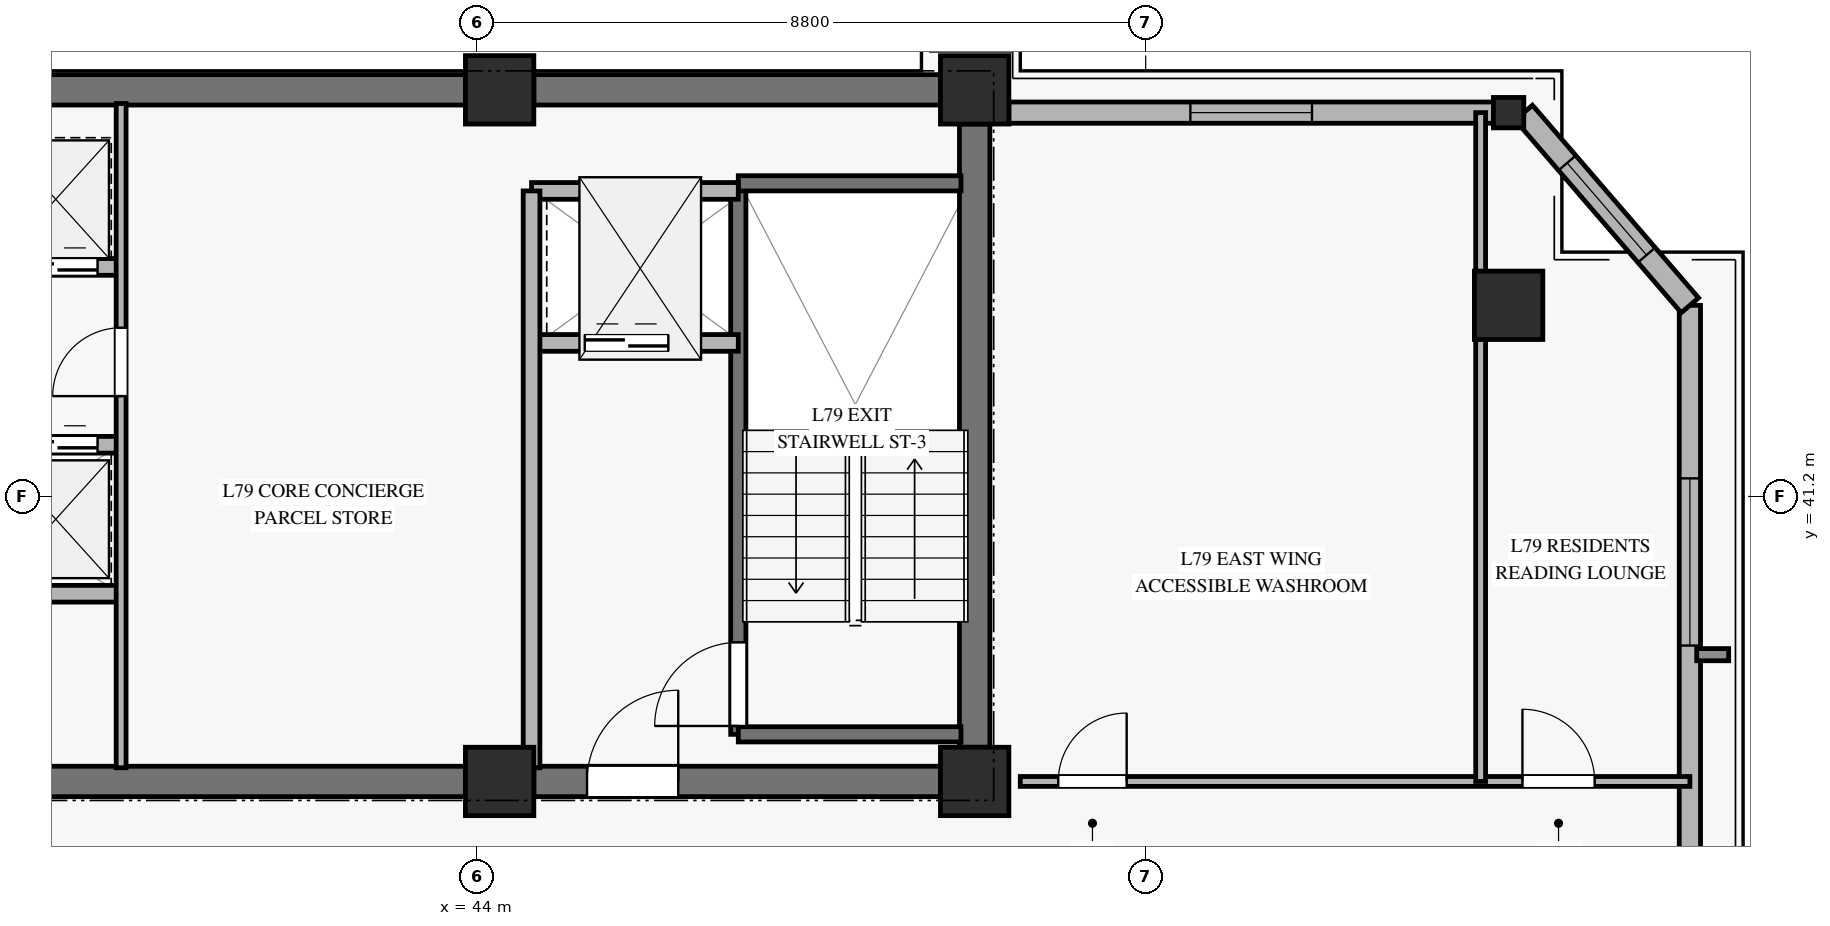
"""IFC4 building model, lengths in metres.
Left out: names, types, materials, properties, quantities, classifications, styles, units other than length and angle.
Written with IfcOpenShell. Run it as: python <this file> out.ifc"""

import sys

from ifc_helpers import new_model, si_unit, direction, frame, frame_2d, origin, origin_2d, place, context, subcontext, project, spatial, rectangle, hollow_rectangle, extrude, source, transform, mapped, element, fill, save


model = new_model("IFC4")
c1 = context("Model", 3, precision=1e-05, world=origin(), true_north=direction((0.0, 1.0)))
c2 = subcontext(c1, "Body", "Model", "MODEL_VIEW")
j1 = project(units=[si_unit("LENGTHUNIT", "METRE"), si_unit("PLANEANGLEUNIT", "RADIAN")], contexts=[c1])
p1 = place(None, origin())
s1 = spatial("IfcSite", under=j1, at=p1, CompositionType="ELEMENT")
p2 = place(p1, origin())
s2 = spatial("IfcBuilding", under=s1, at=p2, CompositionType="ELEMENT")
p3 = place(p2, frame((0.0, 0.0, 307.4)))
s3 = spatial("IfcBuildingStorey", under=s2, at=p3, CompositionType="ELEMENT", Elevation=307.4)
m1 = source(origin(), c2, "Body", "SweptSolid", [
    extrude(rectangle(XDim=0.9, YDim=0.9, at=origin_2d()), origin(), (0.0, 0.0, 1.0), 3.185),
])
for number, where, z_axis, x_axis in (
    (1, (44.3, 37.45, 0.0), (0.0, 0.0, 1.0), (1.0, 0.0, 0.0)),
    (2, (44.3, 46.55, 0.0), (0.0, 0.0, 1.0), (1.0, 0.0, 0.0)),
    (3, (50.55, 37.45, 0.0), (0.0, 0.0, 1.0), (1.0, 0.0, 0.0)),
    (4, (50.55, 46.55, 0.0), (0.0, 0.0, 1.0), (1.0, 0.0, 0.0)),
):
    element("IfcColumn", number, at=place(p3, frame(where, z_axis=z_axis, x_axis=x_axis)), inside=s3, PredefinedType="PILASTER", context=c2, shape_type="MappedRepresentation", body=[
        mapped(m1, transform((0.0, 0.0, 0.0), x_axis=(1.0, 0.0, 0.0), y_axis=(0.0, 1.0, 0.0), z_axis=(0.0, 0.0, 1.0), scale=1.0)),
    ])
p4 = place(p3, frame((36.05, 46.55, 0.0), z_axis=(0.0, 0.0, 1.0), x_axis=(1.0, 0.0, 0.0)))
e5 = element("IfcWall", 5, at=p4, inside=s3, PredefinedType="SHEAR", context=c2, shape_type="SweptSolid", body=[
    extrude(rectangle(XDim=7.8, YDim=0.4, at=frame_2d((3.9, 0.0))), origin(), (0.0, 0.0, 1.0), 3.185),
])
p5 = place(p3, frame((44.75, 46.55, 0.0), z_axis=(0.0, 0.0, 1.0), x_axis=(1.0, 0.0, 0.0)))
e6 = element("IfcWall", 6, at=p5, inside=s3, PredefinedType="SHEAR", context=c2, shape_type="SweptSolid", body=[
    extrude(rectangle(XDim=5.35, YDim=0.4, at=frame_2d((2.675, 0.0))), origin(), (0.0, 0.0, 1.0), 3.185),
])
p6 = place(p3, frame((36.05, 37.45, 0.0), z_axis=(0.0, 0.0, 1.0), x_axis=(1.0, 0.0, 0.0)))
e7 = element("IfcWall", 7, at=p6, inside=s3, PredefinedType="SHEAR", context=c2, shape_type="SweptSolid", body=[
    extrude(rectangle(XDim=7.8, YDim=0.4, at=frame_2d((3.9, 0.0))), origin(), (0.0, 0.0, 1.0), 3.185),
])
p7 = place(p3, frame((44.75, 37.45, 0.0), z_axis=(0.0, 0.0, 1.0), x_axis=(1.0, 0.0, 0.0)))
e8 = element("IfcWall", 8, at=p7, inside=s3, PredefinedType="SHEAR", context=c2, shape_type="SweptSolid", body=[
    extrude(rectangle(XDim=5.35, YDim=0.4, at=frame_2d((2.675, 0.0))), origin(), (0.0, 0.0, 1.0), 3.185),
])
p8 = place(p7, frame((0.7, 0.0, 0.0)))
e9 = element("IfcOpeningElement", 9, at=p8, cuts=e8, PredefinedType="OPENING", context=c2, shape_type="SweptSolid", body=[
    extrude(rectangle(XDim=1.2, YDim=2.15, at=frame_2d((0.6, 1.075))), frame((0.0, 0.21, 0.0), z_axis=(0.0, -1.0, 0.0), x_axis=(1.0, 0.0, 0.0)), (0.0, 0.0, 1.0), 0.42),
])
p9 = place(p3, frame((50.55, 37.9, 0.0), z_axis=(0.0, 0.0, 1.0), x_axis=(0.0, 1.0, 0.0)))
e10 = element("IfcWall", 10, at=p9, inside=s3, PredefinedType="SHEAR", context=c2, shape_type="SweptSolid", body=[
    extrude(rectangle(XDim=8.2, YDim=0.4, at=frame_2d((4.1, 0.0))), origin(), (0.0, 0.0, 1.0), 3.185),
])
m2 = source(origin(), c2, "Body", "SweptSolid", [
    extrude(hollow_rectangle(XDim=0.9, YDim=0.9, WallThickness=0.04, at=origin_2d()), origin(), (0.0, 0.0, 1.0), 3.185),
])
p10 = place(p3, frame((57.575, 43.715, 0.0), z_axis=(0.0, 0.0, 1.0), x_axis=(1.0, 0.0, 0.0)))
e11 = element("IfcColumn", 11, at=p10, inside=s3, PredefinedType="COLUMN", context=c2, shape_type="MappedRepresentation", body=[
    mapped(m2, transform((0.0, 0.0, 0.0), x_axis=(1.0, 0.0, 0.0), y_axis=(0.0, 1.0, 0.0), z_axis=(0.0, 0.0, 1.0), scale=1.0)),
])
m3 = source(origin(), c2, "Body", "SweptSolid", [
    extrude(hollow_rectangle(XDim=0.4, YDim=0.4, WallThickness=0.02, at=origin_2d()), origin(), (0.0, 0.0, 1.0), 3.185),
])
p11 = place(p3, frame((57.575, 46.25, 0.0), z_axis=(0.0, 0.0, 1.0), x_axis=(1.0, 0.0, 0.0)))
e12 = element("IfcColumn", 12, at=p11, inside=s3, PredefinedType="COLUMN", context=c2, shape_type="MappedRepresentation", body=[
    mapped(m3, transform((0.0, 0.0, 0.0), x_axis=(1.0, 0.0, 0.0), y_axis=(0.0, 1.0, 0.0), z_axis=(0.0, 0.0, 1.0), scale=1.0)),
])
p12 = place(p3, frame((59.96, 33.136, 0.0), z_axis=(0.0, 0.0, 1.0), x_axis=(0.0, 1.0, 0.0)))
e13 = element("IfcWall", 13, at=p12, inside=s3, PredefinedType="SOLIDWALL", context=c2, shape_type="SweptSolid", body=[
    extrude(rectangle(XDim=10.579, YDim=0.28, at=frame_2d((5.29, 0.0))), origin(), (0.0, 0.0, 1.0), 2.815),
])
p13 = place(p12, frame((6.102, 0.0, 0.45)))
e14 = element("IfcOpeningElement", 14, at=p13, cuts=e13, PredefinedType="OPENING", context=c2, shape_type="SweptSolid", body=[
    extrude(rectangle(XDim=2.2, YDim=2.1, at=frame_2d((1.1, 1.05))), frame((0.0, 0.15, 0.0), z_axis=(0.0, -1.0, 0.0), x_axis=(1.0, 0.0, 0.0)), (0.0, 0.0, 1.0), 0.3),
])
p14 = place(p3, frame((51.0, 46.25, 0.0), z_axis=(0.0, 0.0, 1.0), x_axis=(1.0, 0.0, 0.0)))
e15 = element("IfcWall", 15, at=p14, inside=s3, PredefinedType="SOLIDWALL", context=c2, shape_type="SweptSolid", body=[
    extrude(rectangle(XDim=6.375, YDim=0.28, at=frame_2d((3.188, 0.0))), origin(), (0.0, 0.0, 1.0), 2.815),
])
p15 = place(p14, frame((2.388, 0.0, 0.45)))
e16 = element("IfcOpeningElement", 16, at=p15, cuts=e15, PredefinedType="OPENING", context=c2, shape_type="SweptSolid", body=[
    extrude(rectangle(XDim=1.6, YDim=2.0, at=frame_2d((0.8, 1.0))), frame((0.0, 0.15, 0.0), z_axis=(0.0, -1.0, 0.0), x_axis=(1.0, 0.0, 0.0)), (0.0, 0.0, 1.0), 0.3),
])
p16 = place(p3, frame((59.96, 43.715, 0.0), z_axis=(0.0, 0.0, 1.0), x_axis=(-0.652903544361, 0.757441061576, 0.0)))
e17 = element("IfcWall", 17, at=p16, inside=s3, PredefinedType="SOLIDWALL", context=c2, shape_type="SweptSolid", body=[
    extrude(rectangle(XDim=3.347, YDim=0.3, at=frame_2d((1.673, 0.0))), origin(), (0.0, 0.0, 1.0), 2.815),
])
p17 = place(p16, frame((0.873, 0.0, 0.45)))
e18 = element("IfcOpeningElement", 18, at=p17, cuts=e17, PredefinedType="OPENING", context=c2, shape_type="SweptSolid", body=[
    extrude(rectangle(XDim=1.6, YDim=2.0, at=frame_2d((0.8, 1.0))), frame((0.0, 0.16, 0.0), z_axis=(0.0, -1.0, 0.0), x_axis=(1.0, 0.0, 0.0)), (0.0, 0.0, 1.0), 0.32),
])
p18 = place(p3, frame((47.44, 38.07, 0.0), z_axis=(0.0, 0.0, 1.0), x_axis=(0.0, 1.0, 0.0)))
e19 = element("IfcWall", 19, at=p18, inside=s3, PredefinedType="SOLIDWALL", context=c2, shape_type="SweptSolid", body=[
    extrude(rectangle(XDim=7.25, YDim=0.2, at=frame_2d((3.625, 0.0))), origin(), (0.0, 0.0, 1.0), 3.4),
])
p19 = place(p18, frame((0.11, 0.0, 0.0)))
e20 = element("IfcOpeningElement", 20, at=p19, cuts=e19, PredefinedType="OPENING", context=c2, shape_type="SweptSolid", body=[
    extrude(rectangle(XDim=1.1, YDim=2.15, at=frame_2d((0.55, 1.075))), frame((0.0, 0.11, 0.0), z_axis=(0.0, -1.0, 0.0), x_axis=(1.0, 0.0, 0.0)), (0.0, 0.0, 1.0), 0.22),
])
for number, where, z_axis, x_axis in (
    (21, (47.44, 45.32, 0.0), (0.0, 0.0, 1.0), (1.0, 0.0, 0.0)),
    (22, (47.44, 38.07, 0.0), (0.0, 0.0, 1.0), (1.0, 0.0, 0.0)),
):
    element("IfcWall", number, at=place(p3, frame(where, z_axis=z_axis, x_axis=x_axis)), inside=s3, PredefinedType="SOLIDWALL", context=c2, shape_type="SweptSolid", body=[
        extrude(rectangle(XDim=2.93, YDim=0.2, at=frame_2d((1.465, 0.0))), origin(), (0.0, 0.0, 1.0), 3.4),
    ])
p20 = place(p3, frame((44.72, 43.22, 0.0), z_axis=(0.0, 0.0, 1.0), x_axis=(1.0, 0.0, 0.0)))
e23 = element("IfcWall", 23, at=p20, inside=s3, PredefinedType="SOLIDWALL", context=c2, shape_type="SweptSolid", body=[
    extrude(rectangle(XDim=2.72, YDim=0.22, at=frame_2d((1.36, 0.0))), origin(), (0.0, 0.0, 1.0), 3.185),
])
p21 = place(p20, frame((0.7, 0.0, 0.0)))
e24 = element("IfcOpeningElement", 24, at=p21, cuts=e23, PredefinedType="OPENING", context=c2, shape_type="SweptSolid", body=[
    extrude(rectangle(XDim=1.1, YDim=2.2, at=frame_2d((0.55, 1.1))), frame((0.0, 0.12, 0.0), z_axis=(0.0, -1.0, 0.0), x_axis=(1.0, 0.0, 0.0)), (0.0, 0.0, 1.0), 0.24),
])
p22 = place(p3, frame((44.72, 45.22, 0.0), z_axis=(0.0, 0.0, 1.0), x_axis=(1.0, 0.0, 0.0)))
e25 = element("IfcWall", 25, at=p22, inside=s3, PredefinedType="SOLIDWALL", context=c2, shape_type="SweptSolid", body=[
    extrude(rectangle(XDim=2.72, YDim=0.22, at=frame_2d((1.36, 0.0))), origin(), (0.0, 0.0, 1.0), 3.185),
])
p23 = place(p3, frame((44.72, 37.63, 0.0), z_axis=(0.0, 0.0, 1.0), x_axis=(0.0, 1.0, 0.0)))
e26 = element("IfcWall", 26, at=p23, inside=s3, PredefinedType="SOLIDWALL", context=c2, shape_type="SweptSolid", body=[
    extrude(rectangle(XDim=7.59, YDim=0.22, at=frame_2d((3.795, 0.0))), origin(), (0.0, 0.0, 1.0), 3.185),
])
p24 = place(p3, frame((36.12, 44.22, 0.0), z_axis=(0.0, 0.0, 1.0), x_axis=(1.0, 0.0, 0.0)))
e27 = element("IfcWall", 27, at=p24, inside=s3, PredefinedType="SOLIDWALL", context=c2, shape_type="SweptSolid", body=[
    extrude(rectangle(XDim=3.2, YDim=0.22, at=frame_2d((1.6, 0.0))), origin(), (0.0, 0.0, 1.0), 3.185),
])
p25 = place(p24, frame((0.3, 0.0, 0.0)))
e28 = element("IfcOpeningElement", 28, at=p25, cuts=e27, PredefinedType="OPENING", context=c2, shape_type="SweptSolid", body=[
    extrude(rectangle(XDim=1.1, YDim=2.2, at=frame_2d((0.55, 1.1))), frame((0.0, 0.12, 0.0), z_axis=(0.0, -1.0, 0.0), x_axis=(1.0, 0.0, 0.0)), (0.0, 0.0, 1.0), 0.24),
])
p26 = place(p24, frame((1.79, 0.0, 0.0)))
e29 = element("IfcOpeningElement", 29, at=p26, cuts=e27, PredefinedType="OPENING", context=c2, shape_type="SweptSolid", body=[
    extrude(rectangle(XDim=1.1, YDim=2.2, at=frame_2d((0.55, 1.1))), frame((0.0, 0.12, 0.0), z_axis=(0.0, -1.0, 0.0), x_axis=(1.0, 0.0, 0.0)), (0.0, 0.0, 1.0), 0.24),
])
p27 = place(p3, frame((36.12, 41.88, 0.0), z_axis=(0.0, 0.0, 1.0), x_axis=(1.0, 0.0, 0.0)))
e30 = element("IfcWall", 30, at=p27, inside=s3, PredefinedType="SOLIDWALL", context=c2, shape_type="SweptSolid", body=[
    extrude(rectangle(XDim=3.2, YDim=0.22, at=frame_2d((1.6, 0.0))), origin(), (0.0, 0.0, 1.0), 3.185),
])
p28 = place(p27, frame((0.3, 0.0, 0.0)))
e31 = element("IfcOpeningElement", 31, at=p28, cuts=e30, PredefinedType="OPENING", context=c2, shape_type="SweptSolid", body=[
    extrude(rectangle(XDim=1.1, YDim=2.2, at=frame_2d((0.55, 1.1))), frame((0.0, 0.12, 0.0), z_axis=(0.0, -1.0, 0.0), x_axis=(1.0, 0.0, 0.0)), (0.0, 0.0, 1.0), 0.24),
])
p29 = place(p27, frame((1.79, 0.0, 0.0)))
e32 = element("IfcOpeningElement", 32, at=p29, cuts=e30, PredefinedType="OPENING", context=c2, shape_type="SweptSolid", body=[
    extrude(rectangle(XDim=1.1, YDim=2.2, at=frame_2d((0.55, 1.1))), frame((0.0, 0.12, 0.0), z_axis=(0.0, -1.0, 0.0), x_axis=(1.0, 0.0, 0.0)), (0.0, 0.0, 1.0), 0.24),
])
p30 = place(p3, frame((36.12, 39.92, 0.0), z_axis=(0.0, 0.0, 1.0), x_axis=(1.0, 0.0, 0.0)))
e33 = element("IfcWall", 33, at=p30, inside=s3, PredefinedType="SOLIDWALL", context=c2, shape_type="SweptSolid", body=[
    extrude(rectangle(XDim=3.2, YDim=0.22, at=frame_2d((1.6, 0.0))), origin(), (0.0, 0.0, 1.0), 3.185),
])
p31 = place(p3, frame((39.32, 37.63, 0.0), z_axis=(0.0, 0.0, 1.0), x_axis=(0.0, 1.0, 0.0)))
e34 = element("IfcWall", 34, at=p31, inside=s3, PredefinedType="PARTITIONING", context=c2, shape_type="SweptSolid", body=[
    extrude(rectangle(XDim=8.74, YDim=0.13, at=frame_2d((4.37, 0.0))), origin(), (0.0, 0.0, 1.0), 3.185),
])
p32 = place(p31, frame((4.89, 0.0, 0.0)))
e35 = element("IfcOpeningElement", 35, at=p32, cuts=e34, PredefinedType="OPENING", context=c2, shape_type="SweptSolid", body=[
    extrude(rectangle(XDim=0.9, YDim=2.1, at=frame_2d((0.45, 1.05))), frame((0.0, 0.075, 0.0), z_axis=(0.0, -1.0, 0.0), x_axis=(1.0, 0.0, 0.0)), (0.0, 0.0, 1.0), 0.15),
])
p33 = place(p3, frame((51.15, 37.45, 0.0), z_axis=(0.0, 0.0, 1.0), x_axis=(1.0, 0.0, 0.0)))
e36 = element("IfcWall", 36, at=p33, inside=s3, PredefinedType="PARTITIONING", context=c2, shape_type="SweptSolid", body=[
    extrude(rectangle(XDim=8.81, YDim=0.13, at=frame_2d((4.405, 0.0))), origin(), (0.0, 0.0, 1.0), 2.82),
])
p34 = place(p33, frame((0.5, 0.0, 0.0)))
e37 = element("IfcOpeningElement", 37, at=p34, cuts=e36, PredefinedType="OPENING", context=c2, shape_type="SweptSolid", body=[
    extrude(rectangle(XDim=0.9, YDim=2.1, at=frame_2d((0.45, 1.05))), frame((0.0, 0.075, 0.0), z_axis=(0.0, -1.0, 0.0), x_axis=(1.0, 0.0, 0.0)), (0.0, 0.0, 1.0), 0.15),
])
p35 = place(p33, frame((6.607, 0.0, 0.0)))
e38 = element("IfcOpeningElement", 38, at=p35, cuts=e36, PredefinedType="OPENING", context=c2, shape_type="SweptSolid", body=[
    extrude(rectangle(XDim=0.95, YDim=2.1, at=frame_2d((0.475, 1.05))), frame((0.0, 0.075, 0.0), z_axis=(0.0, -1.0, 0.0), x_axis=(1.0, 0.0, 0.0)), (0.0, 0.0, 1.0), 0.15),
])
p36 = place(p3, frame((57.207, 37.45, 0.0), z_axis=(0.0, 0.0, 1.0), x_axis=(0.0, 1.0, 0.0)))
e39 = element("IfcWall", 39, at=p36, inside=s3, PredefinedType="PARTITIONING", context=c2, shape_type="SweptSolid", body=[
    extrude(rectangle(XDim=8.8, YDim=0.13, at=frame_2d((4.4, 0.0))), origin(), (0.0, 0.0, 1.0), 2.82),
])
m4 = source(origin(), c2, "Body", "SweptSolid", [
    extrude(rectangle(XDim=2.2, YDim=2.1, at=frame_2d((1.1, 1.05))), frame((0.0, 0.03, 0.0), z_axis=(0.0, -1.0, 0.0), x_axis=(1.0, 0.0, 0.0)), (0.0, 0.0, 1.0), 0.06),
])
p37 = place(p13, origin())
e40 = element("IfcWindow", 40, at=p37, inside=s3, PartitioningType="SINGLE_PANEL", PredefinedType="WINDOW", context=c2, shape_type="MappedRepresentation", body=[
    mapped(m4, transform((0.0, 0.0, 0.0), x_axis=(1.0, 0.0, 0.0), y_axis=(0.0, 1.0, 0.0), z_axis=(0.0, 0.0, 1.0), scale=1.0)),
])
fill(e14, e40)
m5 = source(origin(), c2, "Body", "SweptSolid", [
    extrude(rectangle(XDim=1.6, YDim=2.0, at=frame_2d((0.8, 1.0))), frame((0.0, 0.03, 0.0), z_axis=(0.0, -1.0, 0.0), x_axis=(1.0, 0.0, 0.0)), (0.0, 0.0, 1.0), 0.06),
])
p38 = place(p15, origin())
e41 = element("IfcWindow", 41, at=p38, inside=s3, PartitioningType="SINGLE_PANEL", PredefinedType="WINDOW", context=c2, shape_type="MappedRepresentation", body=[
    mapped(m5, transform((0.0, 0.0, 0.0), x_axis=(1.0, 0.0, 0.0), y_axis=(0.0, 1.0, 0.0), z_axis=(0.0, 0.0, 1.0), scale=1.0)),
])
fill(e16, e41)
p39 = place(p17, origin())
e42 = element("IfcWindow", 42, at=p39, inside=s3, PartitioningType="SINGLE_PANEL", PredefinedType="WINDOW", context=c2, shape_type="MappedRepresentation", body=[
    mapped(m5, transform((0.0, 0.0, 0.0), x_axis=(1.0, 0.0, 0.0), y_axis=(0.0, 1.0, 0.0), z_axis=(0.0, 0.0, 1.0), scale=1.0)),
])
fill(e18, e42)
m6 = source(origin(), c2, "Body", "SweptSolid", [
    extrude(rectangle(XDim=1.1, YDim=2.15, at=frame_2d((0.55, 1.075))), frame((0.0, 0.025, 0.0), z_axis=(0.0, -1.0, 0.0), x_axis=(1.0, 0.0, 0.0)), (0.0, 0.0, 1.0), 0.05),
])
p40 = place(p19, origin())
e43 = element("IfcDoor", 43, at=p40, inside=s3, OperationType="SINGLE_SWING_LEFT", PredefinedType="DOOR", context=c2, shape_type="MappedRepresentation", body=[
    mapped(m6, transform((0.0, 0.0, 0.0), x_axis=(1.0, 0.0, 0.0), y_axis=(0.0, 1.0, 0.0), z_axis=(0.0, 0.0, 1.0), scale=1.0)),
])
fill(e20, e43)
m7 = source(origin(), c2, "Body", "SweptSolid", [
    extrude(rectangle(XDim=1.1, YDim=2.2, at=frame_2d((0.55, 1.1))), frame((0.0, 0.025, 0.0), z_axis=(0.0, -1.0, 0.0), x_axis=(1.0, 0.0, 0.0)), (0.0, 0.0, 1.0), 0.05),
])
p41 = place(p21, origin())
e44 = element("IfcDoor", 44, at=p41, inside=s3, OperationType="SLIDING_TO_LEFT", PredefinedType="DOOR", context=c2, shape_type="MappedRepresentation", body=[
    mapped(m7, transform((0.0, 0.0, 0.0), x_axis=(1.0, 0.0, 0.0), y_axis=(0.0, 1.0, 0.0), z_axis=(0.0, 0.0, 1.0), scale=1.0)),
])
fill(e24, e44)
m8 = source(origin(), c2, "Body", "SweptSolid", [
    extrude(rectangle(XDim=1.2, YDim=2.15, at=frame_2d((0.6, 1.075))), frame((0.0, 0.025, 0.0), z_axis=(0.0, -1.0, 0.0), x_axis=(1.0, 0.0, 0.0)), (0.0, 0.0, 1.0), 0.05),
])
p42 = place(p8, origin())
e45 = element("IfcDoor", 45, at=p42, inside=s3, OperationType="SINGLE_SWING_RIGHT", PredefinedType="DOOR", context=c2, shape_type="MappedRepresentation", body=[
    mapped(m8, transform((0.0, 0.0, 0.0), x_axis=(1.0, 0.0, 0.0), y_axis=(0.0, 1.0, 0.0), z_axis=(0.0, 0.0, 1.0), scale=1.0)),
])
fill(e9, e45)
p43 = place(p26, origin())
e46 = element("IfcDoor", 46, at=p43, inside=s3, OperationType="SLIDING_TO_LEFT", PredefinedType="DOOR", context=c2, shape_type="MappedRepresentation", body=[
    mapped(m7, transform((0.0, 0.0, 0.0), x_axis=(1.0, 0.0, 0.0), y_axis=(0.0, 1.0, 0.0), z_axis=(0.0, 0.0, 1.0), scale=1.0)),
])
fill(e29, e46)
p44 = place(p29, origin())
e47 = element("IfcDoor", 47, at=p44, inside=s3, OperationType="SLIDING_TO_LEFT", PredefinedType="DOOR", context=c2, shape_type="MappedRepresentation", body=[
    mapped(m7, transform((0.0, 0.0, 0.0), x_axis=(1.0, 0.0, 0.0), y_axis=(0.0, 1.0, 0.0), z_axis=(0.0, 0.0, 1.0), scale=1.0)),
])
fill(e32, e47)
m9 = source(origin(), c2, "Body", "SweptSolid", [
    extrude(rectangle(XDim=0.9, YDim=2.1, at=frame_2d((0.45, 1.05))), frame((0.0, 0.025, 0.0), z_axis=(0.0, -1.0, 0.0), x_axis=(1.0, 0.0, 0.0)), (0.0, 0.0, 1.0), 0.05),
])
p45 = place(p32, origin())
e48 = element("IfcDoor", 48, at=p45, inside=s3, OperationType="SINGLE_SWING_LEFT", PredefinedType="DOOR", context=c2, shape_type="MappedRepresentation", body=[
    mapped(m9, transform((0.0, 0.0, 0.0), x_axis=(1.0, 0.0, 0.0), y_axis=(0.0, 1.0, 0.0), z_axis=(0.0, 0.0, 1.0), scale=1.0)),
])
fill(e35, e48)
p46 = place(p34, origin())
e49 = element("IfcDoor", 49, at=p46, inside=s3, OperationType="SINGLE_SWING_RIGHT", PredefinedType="DOOR", context=c2, shape_type="MappedRepresentation", body=[
    mapped(m9, transform((0.0, 0.0, 0.0), x_axis=(1.0, 0.0, 0.0), y_axis=(0.0, 1.0, 0.0), z_axis=(0.0, 0.0, 1.0), scale=1.0)),
])
fill(e37, e49)
m10 = source(origin(), c2, "Body", "SweptSolid", [
    extrude(rectangle(XDim=0.95, YDim=2.1, at=frame_2d((0.475, 1.05))), frame((0.0, 0.025, 0.0), z_axis=(0.0, -1.0, 0.0), x_axis=(1.0, 0.0, 0.0)), (0.0, 0.0, 1.0), 0.05),
])
p47 = place(p35, origin())
e50 = element("IfcDoor", 50, at=p47, inside=s3, OperationType="SINGLE_SWING_LEFT", PredefinedType="DOOR", context=c2, shape_type="MappedRepresentation", body=[
    mapped(m10, transform((0.0, 0.0, 0.0), x_axis=(1.0, 0.0, 0.0), y_axis=(0.0, 1.0, 0.0), z_axis=(0.0, 0.0, 1.0), scale=1.0)),
])
fill(e38, e50)
save(model, sys.argv[1])
